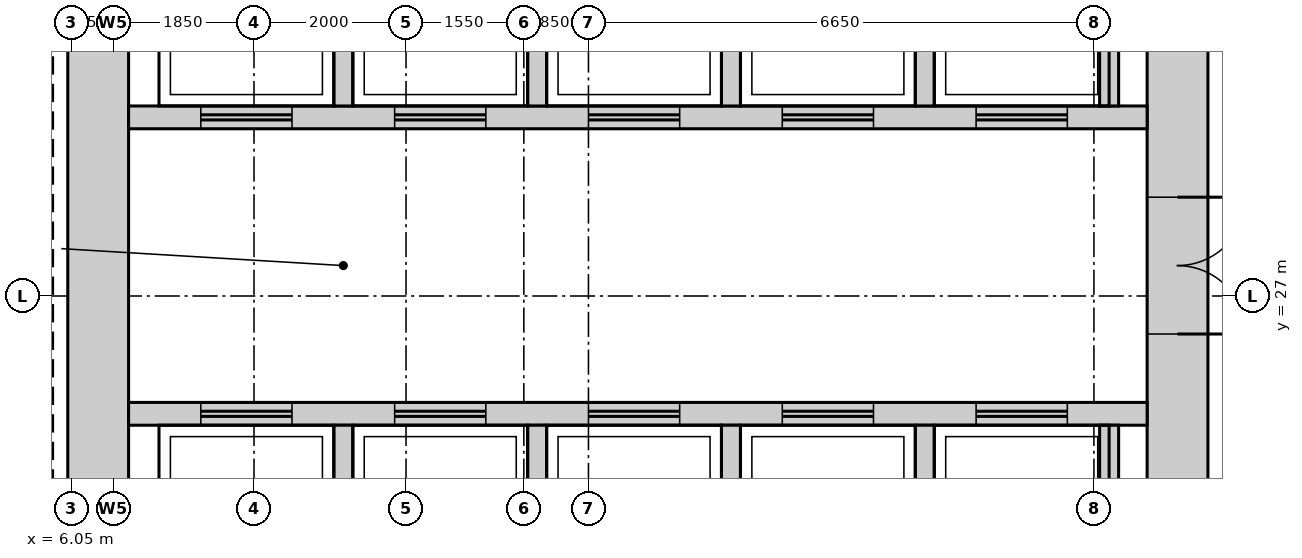
"""IFC4 building model, lengths in metres.
Left out: names, types, materials, properties, quantities, classifications, styles, units other than length and angle.
Written with IfcOpenShell. Run it as: python <this file> out.ifc"""

import sys

from ifc_helpers import new_model, si_unit, direction, frame, frame_2d, origin, place, context, subcontext, project, spatial, rectangle, extrude, source, transform, mapped, element, fill, save


model = new_model("IFC4")
c1 = context("Model", 3, precision=1e-05, world=origin(), true_north=direction((0.0, 1.0)))
c2 = subcontext(c1, "Body", "Model", "MODEL_VIEW")
j1 = project(units=[si_unit("LENGTHUNIT", "METRE"), si_unit("PLANEANGLEUNIT", "RADIAN")], contexts=[c1])
p1 = place(None, origin())
s1 = spatial("IfcSite", under=j1, at=p1, CompositionType="ELEMENT")
p2 = place(p1, origin())
s2 = spatial("IfcBuilding", under=s1, at=p2, CompositionType="ELEMENT")
p3 = place(p2, frame((0.0, 0.0, 184.7)))
s3 = spatial("IfcBuildingStorey", under=s2, at=p3, CompositionType="ELEMENT", Elevation=184.7)
m1 = source(origin(), c2, "Body", "SweptSolid", [
    extrude(rectangle(XDim=22.4, YDim=0.8, at=frame_2d((11.2, 0.0))), origin(), (0.0, 0.0, 1.0), 3.75),
])
p4 = place(p3, frame((20.6, 15.8, 0.0), z_axis=(0.0, 0.0, 1.0), x_axis=(0.0, 1.0, 0.0)))
e1 = element("IfcWall", 1, at=p4, inside=s3, PredefinedType="SHEAR", context=c2, shape_type="MappedRepresentation", body=[
    mapped(m1, transform((0.0, 0.0, 0.0))),
])
m2 = source(origin(), c2, "Body", "SweptSolid", [
    extrude(rectangle(XDim=1.8, YDim=2.1, at=frame_2d((0.9, 1.05))), frame((0.0, 0.41, 0.0), z_axis=(0.0, -1.0, 0.0), x_axis=(1.0, 0.0, 0.0)), (0.0, 0.0, 1.0), 0.82),
])
p5 = place(p4, frame((10.7, 0.0, 0.0)))
e2 = element("IfcOpeningElement", 2, at=p5, cuts=e1, PredefinedType="OPENING", context=c2, shape_type="MappedRepresentation", body=[
    mapped(m2, transform((0.0, 0.0, 0.0))),
])
m3 = source(origin(), c2, "Body", "SweptSolid", [
    extrude(rectangle(XDim=0.9, YDim=2.1, at=frame_2d((0.45, 1.05))), frame((0.0, 0.41, 0.0), z_axis=(0.0, -1.0, 0.0), x_axis=(1.0, 0.0, 0.0)), (0.0, 0.0, 1.0), 0.82),
])
p6 = place(p4, frame((0.35, 0.0, 0.0)))
e3 = element("IfcOpeningElement", 3, at=p6, cuts=e1, PredefinedType="OPENING", context=c2, shape_type="MappedRepresentation", body=[
    mapped(m3, transform((0.0, 0.0, 0.0))),
])
p7 = place(p4, frame((3.9, 0.0, 0.0)))
e4 = element("IfcOpeningElement", 4, at=p7, cuts=e1, PredefinedType="OPENING", context=c2, shape_type="MappedRepresentation", body=[
    mapped(m3, transform((0.0, 0.0, 0.0))),
])
p8 = place(p3, frame((6.4, 15.8, 0.0), z_axis=(0.0, 0.0, 1.0), x_axis=(0.0, 1.0, 0.0)))
e5 = element("IfcWall", 5, at=p8, inside=s3, PredefinedType="SHEAR", context=c2, shape_type="MappedRepresentation", body=[
    mapped(m1, transform((0.0, 0.0, 0.0))),
])
m4 = source(origin(), c2, "Body", "SweptSolid", [
    extrude(rectangle(XDim=13.4, YDim=0.3, at=frame_2d((6.7, 0.0))), origin(), (0.0, 0.0, 1.0), 3.75),
])
p9 = place(p3, frame((6.8, 29.35, 0.0), z_axis=(0.0, 0.0, 1.0), x_axis=(1.0, 0.0, 0.0)))
e6 = element("IfcWall", 6, at=p9, inside=s3, PredefinedType="STANDARD", context=c2, shape_type="MappedRepresentation", body=[
    mapped(m4, transform((0.0, 0.0, 0.0))),
])
m5 = source(origin(), c2, "Body", "SweptSolid", [
    extrude(rectangle(XDim=1.2, YDim=2.1, at=frame_2d((0.6, 1.05))), frame((0.0, 0.16, 0.0), z_axis=(0.0, -1.0, 0.0), x_axis=(1.0, 0.0, 0.0)), (0.0, 0.0, 1.0), 0.32),
])
p10 = place(p9, frame((0.95, 0.0, 0.0)))
e7 = element("IfcOpeningElement", 7, at=p10, cuts=e6, PredefinedType="OPENING", context=c2, shape_type="MappedRepresentation", body=[
    mapped(m5, transform((0.0, 0.0, 0.0))),
])
p11 = place(p9, frame((3.5, 0.0, 0.0)))
e8 = element("IfcOpeningElement", 8, at=p11, cuts=e6, PredefinedType="OPENING", context=c2, shape_type="MappedRepresentation", body=[
    mapped(m5, transform((0.0, 0.0, 0.0))),
])
p12 = place(p9, frame((6.05, 0.0, 0.0)))
e9 = element("IfcOpeningElement", 9, at=p12, cuts=e6, PredefinedType="OPENING", context=c2, shape_type="MappedRepresentation", body=[
    mapped(m5, transform((0.0, 0.0, 0.0))),
])
p13 = place(p9, frame((8.6, 0.0, 0.0)))
e10 = element("IfcOpeningElement", 10, at=p13, cuts=e6, PredefinedType="OPENING", context=c2, shape_type="MappedRepresentation", body=[
    mapped(m5, transform((0.0, 0.0, 0.0))),
])
p14 = place(p9, frame((11.15, 0.0, 0.0)))
e11 = element("IfcOpeningElement", 11, at=p14, cuts=e6, PredefinedType="OPENING", context=c2, shape_type="MappedRepresentation", body=[
    mapped(m5, transform((0.0, 0.0, 0.0))),
])
p15 = place(p3, frame((6.8, 25.45, 0.0), z_axis=(0.0, 0.0, 1.0), x_axis=(1.0, 0.0, 0.0)))
e12 = element("IfcWall", 12, at=p15, inside=s3, PredefinedType="STANDARD", context=c2, shape_type="MappedRepresentation", body=[
    mapped(m4, transform((0.0, 0.0, 0.0))),
])
p16 = place(p15, frame((0.95, 0.0, 0.0)))
e13 = element("IfcOpeningElement", 13, at=p16, cuts=e12, PredefinedType="OPENING", context=c2, shape_type="MappedRepresentation", body=[
    mapped(m5, transform((0.0, 0.0, 0.0))),
])
p17 = place(p15, frame((3.5, 0.0, 0.0)))
e14 = element("IfcOpeningElement", 14, at=p17, cuts=e12, PredefinedType="OPENING", context=c2, shape_type="MappedRepresentation", body=[
    mapped(m5, transform((0.0, 0.0, 0.0))),
])
p18 = place(p15, frame((6.05, 0.0, 0.0)))
e15 = element("IfcOpeningElement", 15, at=p18, cuts=e12, PredefinedType="OPENING", context=c2, shape_type="MappedRepresentation", body=[
    mapped(m5, transform((0.0, 0.0, 0.0))),
])
p19 = place(p15, frame((8.6, 0.0, 0.0)))
e16 = element("IfcOpeningElement", 16, at=p19, cuts=e12, PredefinedType="OPENING", context=c2, shape_type="MappedRepresentation", body=[
    mapped(m5, transform((0.0, 0.0, 0.0))),
])
p20 = place(p15, frame((11.15, 0.0, 0.0)))
e17 = element("IfcOpeningElement", 17, at=p20, cuts=e12, PredefinedType="OPENING", context=c2, shape_type="MappedRepresentation", body=[
    mapped(m5, transform((0.0, 0.0, 0.0))),
])
m6 = source(origin(), c2, "Body", "SweptSolid", [
    extrude(rectangle(XDim=2.4, YDim=0.25, at=frame_2d((1.2, 0.0))), origin(), (0.0, 0.0, 1.0), 3.75),
])
for number, where, z_axis, x_axis in (
    (18, (17.275, 29.5, 0.0), (0.0, 0.0, 1.0), (0.0, 1.0, 0.0)),
    (19, (19.7, 29.5, 0.0), (0.0, 0.0, 1.0), (0.0, 1.0, 0.0)),
    (20, (9.625, 29.5, 0.0), (0.0, 0.0, 1.0), (0.0, 1.0, 0.0)),
    (21, (12.175, 29.5, 0.0), (0.0, 0.0, 1.0), (0.0, 1.0, 0.0)),
    (22, (14.725, 29.5, 0.0), (0.0, 0.0, 1.0), (0.0, 1.0, 0.0)),
):
    element("IfcWall", number, at=place(p3, frame(where, z_axis=z_axis, x_axis=x_axis)), inside=s3, PredefinedType="STANDARD", context=c2, shape_type="MappedRepresentation", body=[
        mapped(m6, transform((0.0, 0.0, 0.0))),
    ])
m7 = source(origin(), c2, "Body", "SweptSolid", [
    extrude(rectangle(XDim=2.4, YDim=0.25, at=frame_2d((1.2, 0.0))), origin(), (0.0, 0.0, 1.0), 3.75),
])
for number, where, z_axis, x_axis in (
    (23, (17.275, 22.9, 0.0), (0.0, 0.0, 1.0), (0.0, 1.0, 0.0)),
    (24, (19.7, 22.9, 0.0), (0.0, 0.0, 1.0), (0.0, 1.0, 0.0)),
    (25, (9.625, 22.9, 0.0), (0.0, 0.0, 1.0), (0.0, 1.0, 0.0)),
    (26, (12.175, 22.9, 0.0), (0.0, 0.0, 1.0), (0.0, 1.0, 0.0)),
    (27, (14.725, 22.9, 0.0), (0.0, 0.0, 1.0), (0.0, 1.0, 0.0)),
):
    element("IfcWall", number, at=place(p3, frame(where, z_axis=z_axis, x_axis=x_axis)), inside=s3, PredefinedType="STANDARD", context=c2, shape_type="MappedRepresentation", body=[
        mapped(m7, transform((0.0, 0.0, 0.0))),
    ])
m8 = source(origin(), c2, "Body", "SweptSolid", [
    extrude(rectangle(XDim=1.8, YDim=2.1, at=frame_2d((0.9, 1.05))), frame((0.0, 0.35, 0.0), z_axis=(0.0, -1.0, 0.0), x_axis=(1.0, 0.0, 0.0)), (0.0, 0.0, 1.0), 0.7),
])
p21 = place(p5, origin())
e28 = element("IfcDoor", 28, at=p21, inside=s3, OperationType="DOUBLE_DOOR_SINGLE_SWING", PredefinedType="DOOR", context=c2, shape_type="MappedRepresentation", body=[
    mapped(m8, transform((0.0, 0.0, 0.0))),
])
fill(e2, e28)
m9 = source(origin(), c2, "Body", "SweptSolid", [
    extrude(rectangle(XDim=1.2, YDim=2.1, at=frame_2d((0.6, 1.05))), frame((0.0, 0.025, 0.0), z_axis=(0.0, -1.0, 0.0), x_axis=(1.0, 0.0, 0.0)), (0.0, 0.0, 1.0), 0.05),
])
p22 = place(p16, origin())
e29 = element("IfcDoor", 29, at=p22, inside=s3, OperationType="DOUBLE_DOOR_SLIDING", PredefinedType="DOOR", context=c2, shape_type="MappedRepresentation", body=[
    mapped(m9, transform((0.0, 0.0, 0.0))),
])
fill(e13, e29)
p23 = place(p17, origin())
e30 = element("IfcDoor", 30, at=p23, inside=s3, OperationType="DOUBLE_DOOR_SLIDING", PredefinedType="DOOR", context=c2, shape_type="MappedRepresentation", body=[
    mapped(m9, transform((0.0, 0.0, 0.0))),
])
fill(e14, e30)
p24 = place(p18, origin())
e31 = element("IfcDoor", 31, at=p24, inside=s3, OperationType="DOUBLE_DOOR_SLIDING", PredefinedType="DOOR", context=c2, shape_type="MappedRepresentation", body=[
    mapped(m9, transform((0.0, 0.0, 0.0))),
])
fill(e15, e31)
p25 = place(p19, origin())
e32 = element("IfcDoor", 32, at=p25, inside=s3, OperationType="DOUBLE_DOOR_SLIDING", PredefinedType="DOOR", context=c2, shape_type="MappedRepresentation", body=[
    mapped(m9, transform((0.0, 0.0, 0.0))),
])
fill(e16, e32)
p26 = place(p20, origin())
e33 = element("IfcDoor", 33, at=p26, inside=s3, OperationType="DOUBLE_DOOR_SLIDING", PredefinedType="DOOR", context=c2, shape_type="MappedRepresentation", body=[
    mapped(m9, transform((0.0, 0.0, 0.0))),
])
fill(e17, e33)
p27 = place(p10, origin())
e34 = element("IfcDoor", 34, at=p27, inside=s3, OperationType="DOUBLE_DOOR_SLIDING", PredefinedType="DOOR", context=c2, shape_type="MappedRepresentation", body=[
    mapped(m9, transform((0.0, 0.0, 0.0))),
])
fill(e7, e34)
p28 = place(p11, origin())
e35 = element("IfcDoor", 35, at=p28, inside=s3, OperationType="DOUBLE_DOOR_SLIDING", PredefinedType="DOOR", context=c2, shape_type="MappedRepresentation", body=[
    mapped(m9, transform((0.0, 0.0, 0.0))),
])
fill(e8, e35)
p29 = place(p12, origin())
e36 = element("IfcDoor", 36, at=p29, inside=s3, OperationType="DOUBLE_DOOR_SLIDING", PredefinedType="DOOR", context=c2, shape_type="MappedRepresentation", body=[
    mapped(m9, transform((0.0, 0.0, 0.0))),
])
fill(e9, e36)
p30 = place(p13, origin())
e37 = element("IfcDoor", 37, at=p30, inside=s3, OperationType="DOUBLE_DOOR_SLIDING", PredefinedType="DOOR", context=c2, shape_type="MappedRepresentation", body=[
    mapped(m9, transform((0.0, 0.0, 0.0))),
])
fill(e10, e37)
p31 = place(p14, origin())
e38 = element("IfcDoor", 38, at=p31, inside=s3, OperationType="DOUBLE_DOOR_SLIDING", PredefinedType="DOOR", context=c2, shape_type="MappedRepresentation", body=[
    mapped(m9, transform((0.0, 0.0, 0.0))),
])
fill(e11, e38)
save(model, sys.argv[1])
